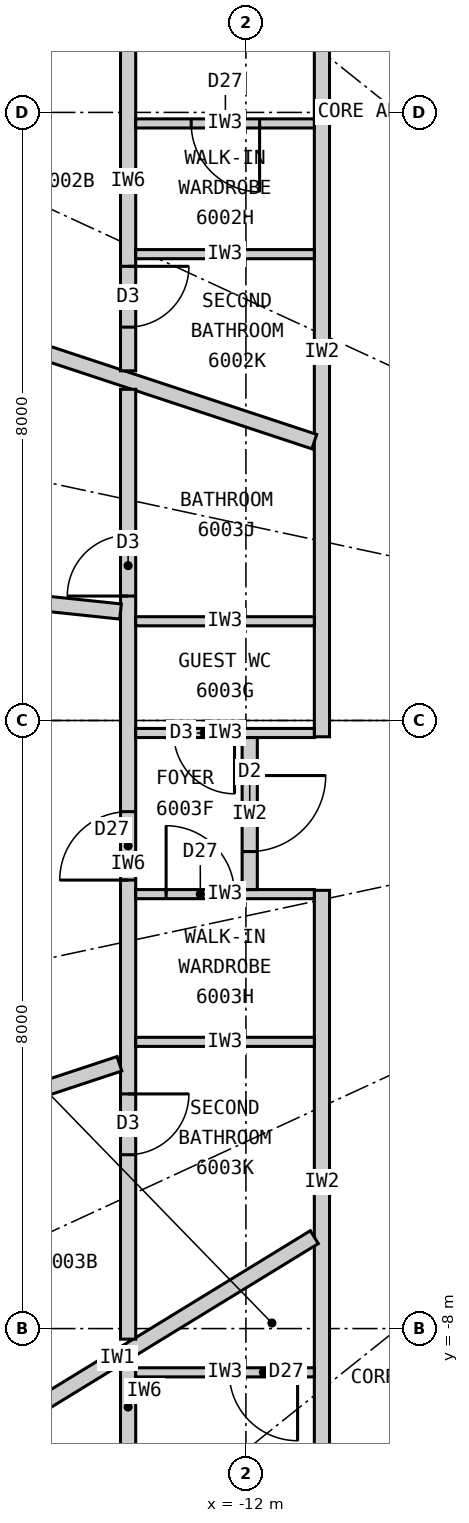
"""IFC4 building model, lengths in metres.
Left out: names, types, materials, properties, quantities, classifications, styles, units other than length and angle.
Written with IfcOpenShell. Run it as: python <this file> out.ifc"""

import sys

from ifc_helpers import new_model, si_unit, direction, frame, frame_2d, origin, place, context, subcontext, project, spatial, rectangle, extrude, element, fill, save


model = new_model("IFC4")
c1 = context("Model", 3, precision=1e-05, world=origin(), true_north=direction((0.0, 1.0)))
c2 = subcontext(c1, "Body", "Model", "MODEL_VIEW")
j1 = project(units=[si_unit("LENGTHUNIT", "METRE"), si_unit("PLANEANGLEUNIT", "RADIAN")], contexts=[c1])
p1 = place(None, origin())
s1 = spatial("IfcSite", under=j1, at=p1, CompositionType="ELEMENT")
p2 = place(p1, origin())
s2 = spatial("IfcBuilding", under=s1, at=p2, CompositionType="ELEMENT")
p3 = place(p2, frame((0.0, 0.0, 222.6)))
s3 = spatial("IfcBuildingStorey", under=s2, at=p3, CompositionType="ELEMENT", Elevation=222.6)
p4 = place(p3, frame((-11.0, 9.9, 0.0), z_axis=(0.0, 0.0, 1.0), x_axis=(0.0, -1.0, 0.0)))
e1 = element("IfcWall", 1, at=p4, inside=s3, PredefinedType="PARTITIONING", context=c2, shape_type="SweptSolid", body=[
    extrude(rectangle(XDim=10.114, YDim=0.2, at=frame_2d((5.057, 0.0))), origin(), (0.0, 0.0, 1.0), 3.12),
])
p5 = place(p3, frame((-11.0, -2.234, 0.0), z_axis=(0.0, 0.0, 1.0), x_axis=(0.0, -1.0, 0.0)))
e2 = element("IfcWall", 2, at=p5, inside=s3, PredefinedType="PARTITIONING", context=c2, shape_type="SweptSolid", body=[
    extrude(rectangle(XDim=7.666, YDim=0.2, at=frame_2d((3.833, 0.0))), origin(), (0.0, 0.0, 1.0), 3.12),
])
p6 = place(p3, frame((-11.1, 3.669, 0.0), z_axis=(0.0, 0.0, 1.0), x_axis=(-0.949476668397, 0.313837627079, 0.0)))
e3 = element("IfcWall", 3, at=p6, inside=s3, PredefinedType="PARTITIONING", context=c2, shape_type="SweptSolid", body=[
    extrude(rectangle(XDim=8.339, YDim=0.2, at=frame_2d((4.169, 0.0))), origin(), (0.0, 0.0, 1.0), 3.12),
])
p7 = place(p3, frame((-11.1, -6.797, 0.0), z_axis=(0.0, 0.0, 1.0), x_axis=(-0.852799818179, -0.522237943963, 0.0)))
e4 = element("IfcWall", 4, at=p7, inside=s3, PredefinedType="PARTITIONING", context=c2, shape_type="SweptSolid", body=[
    extrude(rectangle(XDim=6.077, YDim=0.2, at=frame_2d((3.039, 0.0))), origin(), (0.0, 0.0, 1.0), 3.12),
])
p8 = place(p3, frame((-13.55, 9.609, 0.0), z_axis=(0.0, 0.0, 1.0), x_axis=(0.0, -1.0, 0.0)))
e5 = element("IfcWall", 5, at=p8, inside=s3, PredefinedType="PARTITIONING", context=c2, shape_type="SweptSolid", body=[
    extrude(rectangle(XDim=5.009, YDim=0.2, at=frame_2d((2.504, 0.0))), origin(), (0.0, 0.0, 1.0), 3.12),
])
p9 = place(p8, frame((3.633, 0.0, 0.0)))
e6 = element("IfcOpeningElement", 6, at=p9, cuts=e5, PredefinedType="OPENING", context=c2, shape_type="SweptSolid", body=[
    extrude(rectangle(XDim=0.8, YDim=2.1, at=frame_2d((0.4, 1.05))), frame((0.0, 0.11, 0.0), z_axis=(0.0, -1.0, 0.0), x_axis=(1.0, 0.0, 0.0)), (0.0, 0.0, 1.0), 0.22),
])
p10 = place(p3, frame((-11.1, 7.855, 0.0), z_axis=(0.0, 0.0, 1.0), x_axis=(-1.0, 0.0, 0.0)))
e7 = element("IfcWall", 7, at=p10, inside=s3, PredefinedType="PARTITIONING", context=c2, shape_type="SweptSolid", body=[
    extrude(rectangle(XDim=2.35, YDim=0.12, at=frame_2d((1.175, 0.0))), origin(), (0.0, 0.0, 1.0), 3.12),
])
p11 = place(p10, frame((0.72, 0.0, 0.0)))
e8 = element("IfcOpeningElement", 8, at=p11, cuts=e7, PredefinedType="OPENING", context=c2, shape_type="SweptSolid", body=[
    extrude(rectangle(XDim=0.9, YDim=2.1, at=frame_2d((0.45, 1.05))), frame((0.0, 0.07, 0.0), z_axis=(0.0, -1.0, 0.0), x_axis=(1.0, 0.0, 0.0)), (0.0, 0.0, 1.0), 0.14),
])
p12 = place(p3, frame((-11.1, 6.135, 0.0), z_axis=(0.0, 0.0, 1.0), x_axis=(-1.0, 0.0, 0.0)))
e9 = element("IfcWall", 9, at=p12, inside=s3, PredefinedType="PARTITIONING", context=c2, shape_type="SweptSolid", body=[
    extrude(rectangle(XDim=2.35, YDim=0.12, at=frame_2d((1.175, 0.0))), origin(), (0.0, 0.0, 1.0), 3.12),
])
p13 = place(p3, frame((-13.55, 4.357, 0.0), z_axis=(0.0, 0.0, 1.0), x_axis=(0.0, -1.0, 0.0)))
e10 = element("IfcWall", 10, at=p13, inside=s3, PredefinedType="PARTITIONING", context=c2, shape_type="SweptSolid", body=[
    extrude(rectangle(XDim=12.496, YDim=0.2, at=frame_2d((6.248, 0.0))), origin(), (0.0, 0.0, 1.0), 3.12),
])
p14 = place(p13, frame((1.92, 0.0, 0.0)))
e11 = element("IfcOpeningElement", 11, at=p14, cuts=e10, PredefinedType="OPENING", context=c2, shape_type="SweptSolid", body=[
    extrude(rectangle(XDim=0.8, YDim=2.1, at=frame_2d((0.4, 1.05))), frame((0.0, 0.11, 0.0), z_axis=(0.0, -1.0, 0.0), x_axis=(1.0, 0.0, 0.0)), (0.0, 0.0, 1.0), 0.22),
])
p15 = place(p13, frame((9.27, 0.0, 0.0)))
e12 = element("IfcOpeningElement", 12, at=p15, cuts=e10, PredefinedType="OPENING", context=c2, shape_type="SweptSolid", body=[
    extrude(rectangle(XDim=0.8, YDim=2.1, at=frame_2d((0.4, 1.05))), frame((0.0, 0.11, 0.0), z_axis=(0.0, -1.0, 0.0), x_axis=(1.0, 0.0, 0.0)), (0.0, 0.0, 1.0), 0.22),
])
p16 = place(p13, frame((5.557, 0.0, 0.0)))
e13 = element("IfcOpeningElement", 13, at=p16, cuts=e10, PredefinedType="OPENING", context=c2, shape_type="SweptSolid", body=[
    extrude(rectangle(XDim=0.9, YDim=2.1, at=frame_2d((0.45, 1.05))), frame((0.0, 0.11, 0.0), z_axis=(0.0, -1.0, 0.0), x_axis=(1.0, 0.0, 0.0)), (0.0, 0.0, 1.0), 0.22),
])
p17 = place(p3, frame((-13.65, 1.434, 0.0), z_axis=(0.0, 0.0, 1.0), x_axis=(-0.994526954268, 0.10448031984, 0.0)))
e14 = element("IfcWall", 14, at=p17, inside=s3, PredefinedType="PARTITIONING", context=c2, shape_type="SweptSolid", body=[
    extrude(rectangle(XDim=6.837, YDim=0.2, at=frame_2d((3.418, 0.0))), origin(), (0.0, 0.0, 1.0), 2.47),
])
p18 = place(p17, frame((2.27, 0.0, 0.0)))
e15 = element("IfcOpeningElement", 15, at=p18, cuts=e14, PredefinedType="OPENING", context=c2, shape_type="SweptSolid", body=[
    extrude(rectangle(XDim=0.9, YDim=2.1, at=frame_2d((0.45, 1.05))), frame((0.0, 0.11, 0.0), z_axis=(0.0, -1.0, 0.0), x_axis=(1.0, 0.0, 0.0)), (0.0, 0.0, 1.0), 0.22),
])
p19 = place(p3, frame((-13.664, -4.516, 0.0), z_axis=(0.0, 0.0, 1.0), x_axis=(-0.949481375941, -0.313823384632, 0.0)))
e16 = element("IfcWall", 16, at=p19, inside=s3, PredefinedType="PARTITIONING", context=c2, shape_type="SweptSolid", body=[
    extrude(rectangle(XDim=5.638, YDim=0.2, at=frame_2d((2.819, 0.0))), origin(), (0.0, 0.0, 1.0), 3.12),
])
p20 = place(p19, frame((1.82, 0.0, 0.0)))
e17 = element("IfcOpeningElement", 17, at=p20, cuts=e16, PredefinedType="OPENING", context=c2, shape_type="SweptSolid", body=[
    extrude(rectangle(XDim=0.9, YDim=2.1, at=frame_2d((0.45, 1.05))), frame((0.0, 0.11, 0.0), z_axis=(0.0, -1.0, 0.0), x_axis=(1.0, 0.0, 0.0)), (0.0, 0.0, 1.0), 0.22),
])
p21 = place(p3, frame((-11.1, 1.306, 0.0), z_axis=(0.0, 0.0, 1.0), x_axis=(-1.0, 0.0, 0.0)))
e18 = element("IfcWall", 18, at=p21, inside=s3, PredefinedType="PARTITIONING", context=c2, shape_type="SweptSolid", body=[
    extrude(rectangle(XDim=2.35, YDim=0.12, at=frame_2d((1.175, 0.0))), origin(), (0.0, 0.0, 1.0), 3.12),
])
p22 = place(p3, frame((-11.1, -0.164, 0.0), z_axis=(0.0, 0.0, 1.0), x_axis=(-1.0, 0.0, 0.0)))
e19 = element("IfcWall", 19, at=p22, inside=s3, PredefinedType="PARTITIONING", context=c2, shape_type="SweptSolid", body=[
    extrude(rectangle(XDim=2.35, YDim=0.12, at=frame_2d((1.175, 0.0))), origin(), (0.0, 0.0, 1.0), 3.12),
])
p23 = place(p22, frame((1.05, 0.0, 0.0)))
e20 = element("IfcOpeningElement", 20, at=p23, cuts=e19, PredefinedType="OPENING", context=c2, shape_type="SweptSolid", body=[
    extrude(rectangle(XDim=0.8, YDim=2.1, at=frame_2d((0.4, 1.05))), frame((0.0, 0.07, 0.0), z_axis=(0.0, -1.0, 0.0), x_axis=(1.0, 0.0, 0.0)), (0.0, 0.0, 1.0), 0.14),
])
p24 = place(p3, frame((-11.1, -2.284, 0.0), z_axis=(0.0, 0.0, 1.0), x_axis=(-1.0, 0.0, 0.0)))
e21 = element("IfcWall", 21, at=p24, inside=s3, PredefinedType="PARTITIONING", context=c2, shape_type="SweptSolid", body=[
    extrude(rectangle(XDim=2.35, YDim=0.12, at=frame_2d((1.175, 0.0))), origin(), (0.0, 0.0, 1.0), 3.12),
])
p25 = place(p24, frame((1.05, 0.0, 0.0)))
e22 = element("IfcOpeningElement", 22, at=p25, cuts=e21, PredefinedType="OPENING", context=c2, shape_type="SweptSolid", body=[
    extrude(rectangle(XDim=0.9, YDim=2.1, at=frame_2d((0.45, 1.05))), frame((0.0, 0.07, 0.0), z_axis=(0.0, -1.0, 0.0), x_axis=(1.0, 0.0, 0.0)), (0.0, 0.0, 1.0), 0.14),
])
p26 = place(p3, frame((-11.1, -4.228, 0.0), z_axis=(0.0, 0.0, 1.0), x_axis=(-1.0, 0.0, 0.0)))
e23 = element("IfcWall", 23, at=p26, inside=s3, PredefinedType="PARTITIONING", context=c2, shape_type="SweptSolid", body=[
    extrude(rectangle(XDim=2.35, YDim=0.12, at=frame_2d((1.175, 0.0))), origin(), (0.0, 0.0, 1.0), 3.12),
])
p27 = place(p3, frame((-11.95, -0.224, 0.0), z_axis=(0.0, 0.0, 1.0), x_axis=(0.0, -1.0, 0.0)))
e24 = element("IfcWall", 24, at=p27, inside=s3, PredefinedType="PARTITIONING", context=c2, shape_type="SweptSolid", body=[
    extrude(rectangle(XDim=2.0, YDim=0.2, at=frame_2d((1.0, 0.0))), origin(), (0.0, 0.0, 1.0), 3.12),
])
p28 = place(p27, frame((0.5, 0.0, 0.0)))
e25 = element("IfcOpeningElement", 25, at=p28, cuts=e24, PredefinedType="OPENING", context=c2, shape_type="SweptSolid", body=[
    extrude(rectangle(XDim=1.0, YDim=2.2, at=frame_2d((0.5, 1.1))), frame((0.0, 0.11, 0.0), z_axis=(0.0, -1.0, 0.0), x_axis=(1.0, 0.0, 0.0)), (0.0, 0.0, 1.0), 0.22),
])
p29 = place(p3, frame((-13.55, -8.456, 0.0), z_axis=(0.0, 0.0, 1.0), x_axis=(0.0, -1.0, 0.0)))
e26 = element("IfcWall", 26, at=p29, inside=s3, PredefinedType="PARTITIONING", context=c2, shape_type="SweptSolid", body=[
    extrude(rectangle(XDim=1.153, YDim=0.2, at=frame_2d((0.576, 0.0))), origin(), (0.0, 0.0, 1.0), 3.12),
])
p30 = place(p3, frame((-11.1, -8.576, 0.0), z_axis=(0.0, 0.0, 1.0), x_axis=(-1.0, 0.0, 0.0)))
e27 = element("IfcWall", 27, at=p30, inside=s3, PredefinedType="PARTITIONING", context=c2, shape_type="SweptSolid", body=[
    extrude(rectangle(XDim=2.35, YDim=0.12, at=frame_2d((1.175, 0.0))), origin(), (0.0, 0.0, 1.0), 3.12),
])
p31 = place(p30, frame((0.22, 0.0, 0.0)))
e28 = element("IfcOpeningElement", 28, at=p31, cuts=e27, PredefinedType="OPENING", context=c2, shape_type="SweptSolid", body=[
    extrude(rectangle(XDim=0.9, YDim=2.1, at=frame_2d((0.45, 1.05))), frame((0.0, 0.07, 0.0), z_axis=(0.0, -1.0, 0.0), x_axis=(1.0, 0.0, 0.0)), (0.0, 0.0, 1.0), 0.14),
])
p32 = place(p11, origin())
e29 = element("IfcDoor", 29, at=p32, inside=s3, OperationType="SINGLE_SWING_LEFT", PredefinedType="DOOR", context=c2, shape_type="SweptSolid", body=[
    extrude(rectangle(XDim=0.9, YDim=2.1, at=frame_2d((0.45, 1.05))), frame((0.0, 0.025, 0.0), z_axis=(0.0, -1.0, 0.0), x_axis=(1.0, 0.0, 0.0)), (0.0, 0.0, 1.0), 0.05),
])
fill(e8, e29)
p33 = place(p9, origin())
e30 = element("IfcDoor", 30, at=p33, inside=s3, OperationType="SINGLE_SWING_LEFT", PredefinedType="DOOR", context=c2, shape_type="SweptSolid", body=[
    extrude(rectangle(XDim=0.8, YDim=2.1, at=frame_2d((0.4, 1.05))), frame((0.0, 0.025, 0.0), z_axis=(0.0, -1.0, 0.0), x_axis=(1.0, 0.0, 0.0)), (0.0, 0.0, 1.0), 0.05),
])
fill(e6, e30)
p34 = place(p28, origin())
e31 = element("IfcDoor", 31, at=p34, inside=s3, OperationType="SINGLE_SWING_LEFT", PredefinedType="DOOR", context=c2, shape_type="SweptSolid", body=[
    extrude(rectangle(XDim=1.0, YDim=2.2, at=frame_2d((0.5, 1.1))), frame((0.0, 0.025, 0.0), z_axis=(0.0, -1.0, 0.0), x_axis=(1.0, 0.0, 0.0)), (0.0, 0.0, 1.0), 0.05),
])
fill(e25, e31)
p35 = place(p14, origin())
e32 = element("IfcDoor", 32, at=p35, inside=s3, OperationType="SINGLE_SWING_RIGHT", PredefinedType="DOOR", context=c2, shape_type="SweptSolid", body=[
    extrude(rectangle(XDim=0.8, YDim=2.1, at=frame_2d((0.4, 1.05))), frame((0.0, 0.025, 0.0), z_axis=(0.0, -1.0, 0.0), x_axis=(1.0, 0.0, 0.0)), (0.0, 0.0, 1.0), 0.05),
])
fill(e11, e32)
p36 = place(p23, origin())
e33 = element("IfcDoor", 33, at=p36, inside=s3, OperationType="SINGLE_SWING_LEFT", PredefinedType="DOOR", context=c2, shape_type="SweptSolid", body=[
    extrude(rectangle(XDim=0.8, YDim=2.1, at=frame_2d((0.4, 1.05))), frame((0.0, 0.025, 0.0), z_axis=(0.0, -1.0, 0.0), x_axis=(1.0, 0.0, 0.0)), (0.0, 0.0, 1.0), 0.05),
])
fill(e20, e33)
p37 = place(p25, origin())
e34 = element("IfcDoor", 34, at=p37, inside=s3, OperationType="SINGLE_SWING_RIGHT", PredefinedType="DOOR", context=c2, shape_type="SweptSolid", body=[
    extrude(rectangle(XDim=0.9, YDim=2.1, at=frame_2d((0.45, 1.05))), frame((0.0, 0.025, 0.0), z_axis=(0.0, -1.0, 0.0), x_axis=(1.0, 0.0, 0.0)), (0.0, 0.0, 1.0), 0.05),
])
fill(e22, e34)
p38 = place(p15, origin())
e35 = element("IfcDoor", 35, at=p38, inside=s3, OperationType="SINGLE_SWING_LEFT", PredefinedType="DOOR", context=c2, shape_type="SweptSolid", body=[
    extrude(rectangle(XDim=0.8, YDim=2.1, at=frame_2d((0.4, 1.05))), frame((0.0, 0.025, 0.0), z_axis=(0.0, -1.0, 0.0), x_axis=(1.0, 0.0, 0.0)), (0.0, 0.0, 1.0), 0.05),
])
fill(e12, e35)
p39 = place(p16, origin())
e36 = element("IfcDoor", 36, at=p39, inside=s3, OperationType="SINGLE_SWING_RIGHT", PredefinedType="DOOR", context=c2, shape_type="SweptSolid", body=[
    extrude(rectangle(XDim=0.9, YDim=2.1, at=frame_2d((0.45, 1.05))), frame((0.0, 0.025, 0.0), z_axis=(0.0, -1.0, 0.0), x_axis=(1.0, 0.0, 0.0)), (0.0, 0.0, 1.0), 0.05),
])
fill(e13, e36)
p40 = place(p31, origin())
e37 = element("IfcDoor", 37, at=p40, inside=s3, OperationType="SINGLE_SWING_LEFT", PredefinedType="DOOR", context=c2, shape_type="SweptSolid", body=[
    extrude(rectangle(XDim=0.9, YDim=2.1, at=frame_2d((0.45, 1.05))), frame((0.0, 0.025, 0.0), z_axis=(0.0, -1.0, 0.0), x_axis=(1.0, 0.0, 0.0)), (0.0, 0.0, 1.0), 0.05),
])
fill(e28, e37)
save(model, sys.argv[1])
